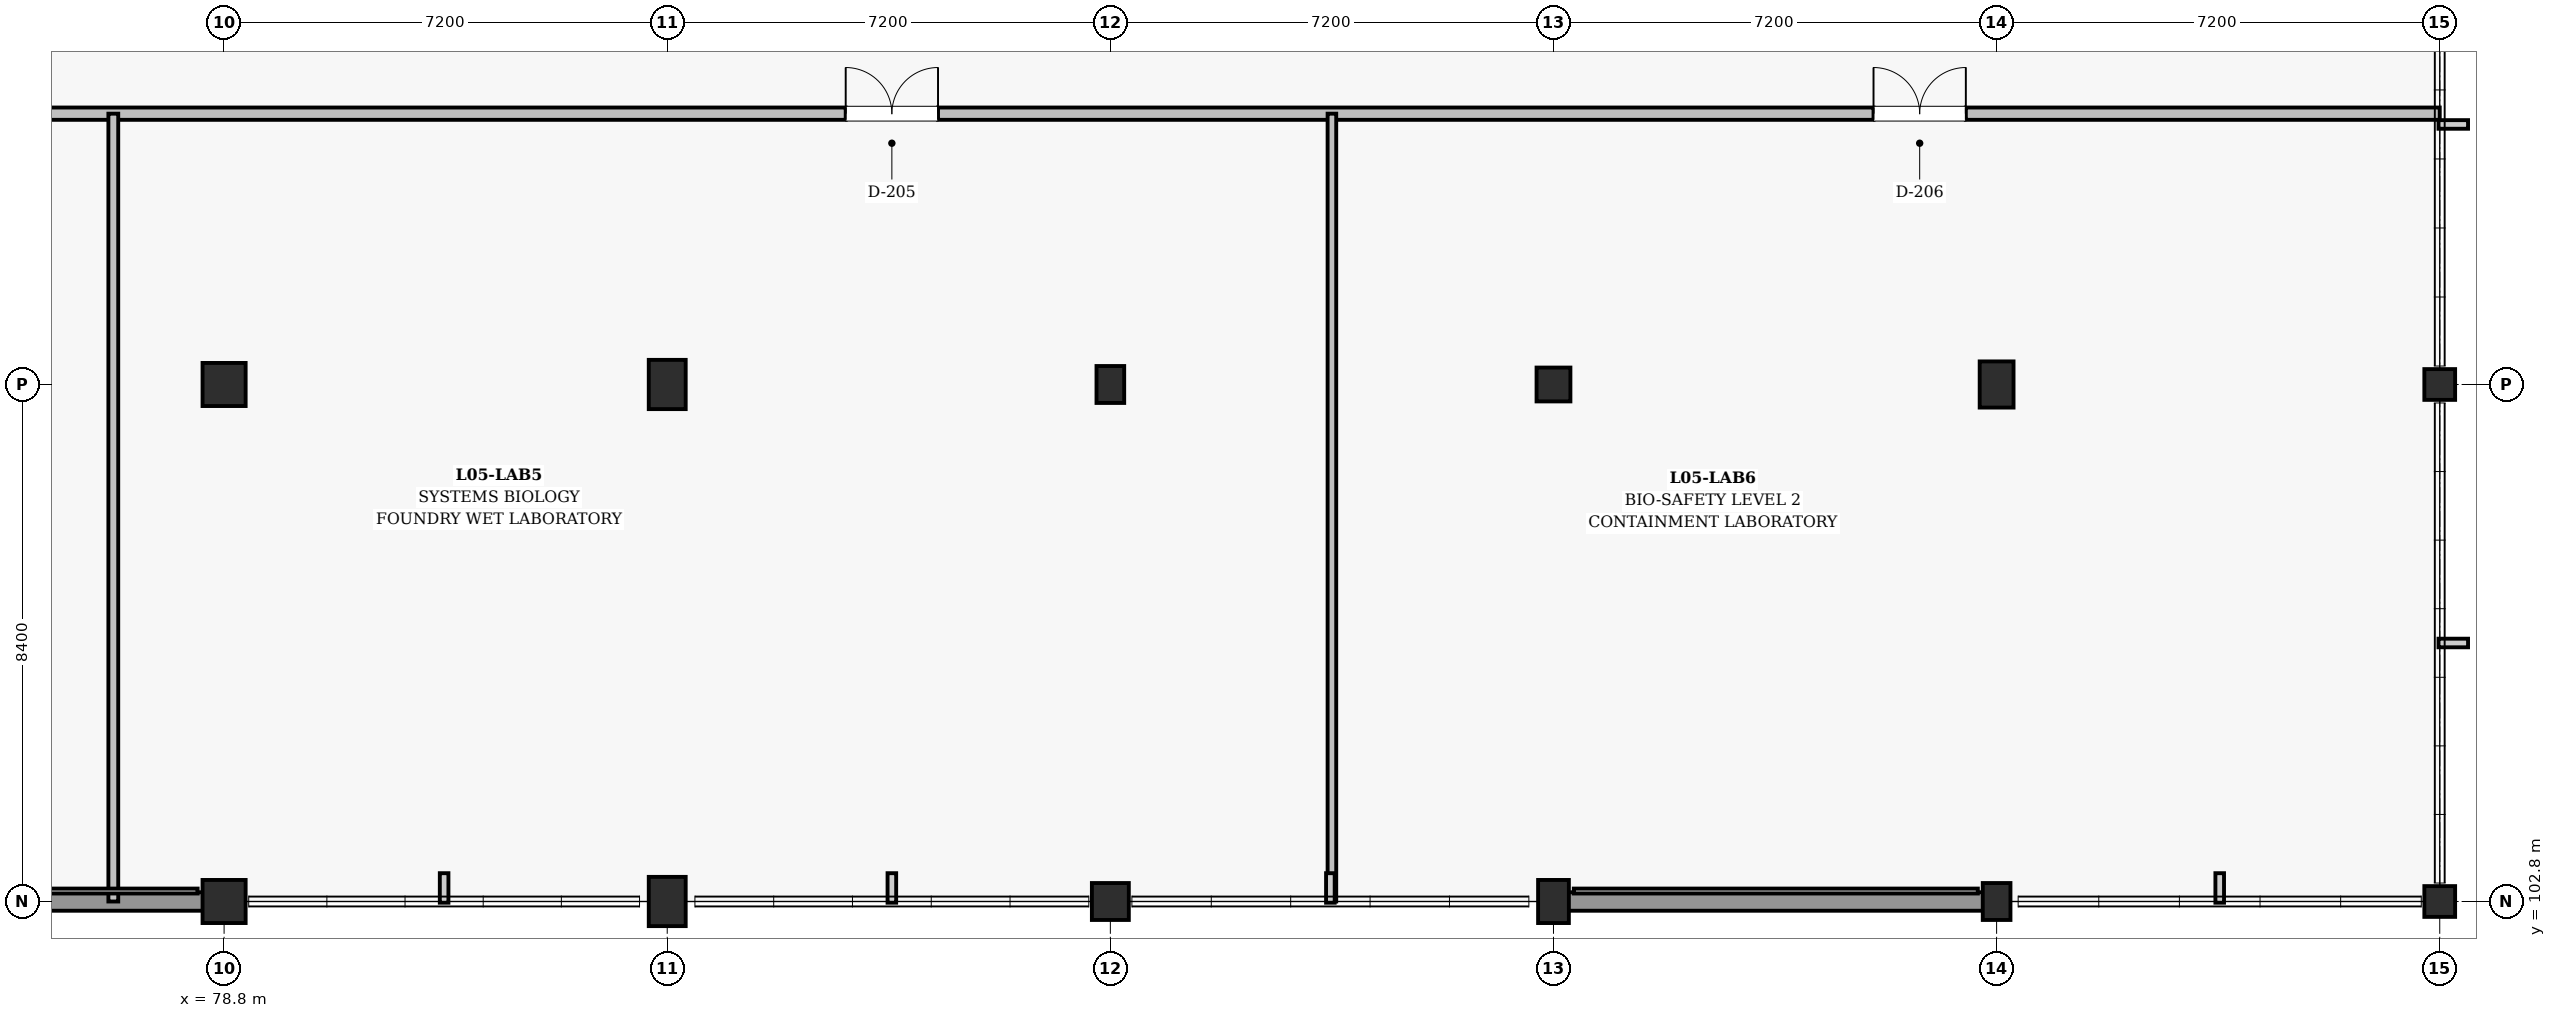
"""IFC4 building model, lengths in metres.
Left out: names, types, materials, properties, quantities, classifications, styles, units other than length and angle.
Written with IfcOpenShell. Run it as: python <this file> out.ifc"""

import sys

from ifc_helpers import new_model, si_unit, direction, frame, frame_2d, origin, origin_2d, place, context, subcontext, project, spatial, rectangle, extrude, element, fill, save


model = new_model("IFC4")
c1 = context("Model", 3, precision=1e-05, world=origin(), true_north=direction((0.0, 1.0)))
c2 = subcontext(c1, "Body", "Model", "MODEL_VIEW")
j1 = project(units=[si_unit("LENGTHUNIT", "METRE"), si_unit("PLANEANGLEUNIT", "RADIAN")], contexts=[c1])
p1 = place(None, origin())
s1 = spatial("IfcSite", under=j1, at=p1, CompositionType="ELEMENT")
p2 = place(p1, origin())
s2 = spatial("IfcBuilding", under=s1, at=p2, CompositionType="ELEMENT")
p3 = place(p2, frame((0.0, 0.0, 23.4)))
s3 = spatial("IfcBuildingStorey", under=s2, at=p3, CompositionType="ELEMENT", Elevation=23.4)
for number, where, z_axis, x_axis in (
    (1, (78.8, 102.8, 0.0), (0.0, 0.0, 1.0), (1.0, 0.0, 0.0)),
    (2, (78.8, 111.2, 0.0), (0.0, 0.0, 1.0), (1.0, 0.0, 0.0)),
):
    element("IfcColumn", number, at=place(p3, frame(where, z_axis=z_axis, x_axis=x_axis)), inside=s3, PredefinedType="COLUMN", context=c2, shape_type="SweptSolid", body=[
        extrude(rectangle(XDim=0.7, YDim=0.7, at=origin_2d()), origin(), (0.0, 0.0, 1.0), 4.5),
    ])
for number, where, z_axis, x_axis in (
    (3, (86.0, 102.8, 0.0), (0.0, 0.0, 1.0), (1.0, 0.0, 0.0)),
    (4, (86.0, 111.2, 0.0), (0.0, 0.0, 1.0), (1.0, 0.0, 0.0)),
):
    element("IfcColumn", number, at=place(p3, frame(where, z_axis=z_axis, x_axis=x_axis)), inside=s3, PredefinedType="COLUMN", context=c2, shape_type="SweptSolid", body=[
        extrude(rectangle(XDim=0.6, YDim=0.8, at=origin_2d()), origin(), (0.0, 0.0, 1.0), 4.5),
    ])
p4 = place(p3, frame((93.2, 102.8, 0.0), z_axis=(0.0, 0.0, 1.0), x_axis=(1.0, 0.0, 0.0)))
e5 = element("IfcColumn", 5, at=p4, inside=s3, PredefinedType="COLUMN", context=c2, shape_type="SweptSolid", body=[
    extrude(rectangle(XDim=0.6, YDim=0.6, at=origin_2d()), origin(), (0.0, 0.0, 1.0), 4.5),
])
p5 = place(p3, frame((93.2, 111.2, 0.0), z_axis=(0.0, 0.0, 1.0), x_axis=(1.0, 0.0, 0.0)))
e6 = element("IfcColumn", 6, at=p5, inside=s3, PredefinedType="COLUMN", context=c2, shape_type="SweptSolid", body=[
    extrude(rectangle(XDim=0.45, YDim=0.6, at=origin_2d()), origin(), (0.0, 0.0, 1.0), 4.5),
])
p6 = place(p3, frame((100.4, 102.8, 0.0), z_axis=(0.0, 0.0, 1.0), x_axis=(1.0, 0.0, 0.0)))
e7 = element("IfcColumn", 7, at=p6, inside=s3, PredefinedType="COLUMN", context=c2, shape_type="SweptSolid", body=[
    extrude(rectangle(XDim=0.5, YDim=0.7, at=origin_2d()), origin(), (0.0, 0.0, 1.0), 4.5),
])
p7 = place(p3, frame((100.4, 111.2, 0.0), z_axis=(0.0, 0.0, 1.0), x_axis=(1.0, 0.0, 0.0)))
e8 = element("IfcColumn", 8, at=p7, inside=s3, PredefinedType="COLUMN", context=c2, shape_type="SweptSolid", body=[
    extrude(rectangle(XDim=0.55, YDim=0.55, at=origin_2d()), origin(), (0.0, 0.0, 1.0), 4.5),
])
p8 = place(p3, frame((107.6, 102.8, 0.0), z_axis=(0.0, 0.0, 1.0), x_axis=(1.0, 0.0, 0.0)))
e9 = element("IfcColumn", 9, at=p8, inside=s3, PredefinedType="COLUMN", context=c2, shape_type="SweptSolid", body=[
    extrude(rectangle(XDim=0.45, YDim=0.6, at=origin_2d()), origin(), (0.0, 0.0, 1.0), 4.5),
])
p9 = place(p3, frame((107.6, 111.2, 0.0), z_axis=(0.0, 0.0, 1.0), x_axis=(1.0, 0.0, 0.0)))
e10 = element("IfcColumn", 10, at=p9, inside=s3, PredefinedType="COLUMN", context=c2, shape_type="SweptSolid", body=[
    extrude(rectangle(XDim=0.55, YDim=0.75, at=origin_2d()), origin(), (0.0, 0.0, 1.0), 4.5),
])
for number, where, z_axis, x_axis in (
    (11, (114.8, 102.8, 0.0), (0.0, 0.0, 1.0), (1.0, 0.0, 0.0)),
    (12, (114.8, 111.2, 0.0), (0.0, 0.0, 1.0), (1.0, 0.0, 0.0)),
):
    element("IfcColumn", number, at=place(p3, frame(where, z_axis=z_axis, x_axis=x_axis)), inside=s3, PredefinedType="COLUMN", context=c2, shape_type="SweptSolid", body=[
        extrude(rectangle(XDim=0.5, YDim=0.5, at=origin_2d()), origin(), (0.0, 0.0, 1.0), 4.5),
    ])
p10 = place(p3, frame((71.88, 102.8, 0.0), z_axis=(0.0, 0.0, 1.0), x_axis=(1.0, 0.0, 0.0)))
e13 = element("IfcWall", 13, at=p10, inside=s3, PredefinedType="SOLIDWALL", context=c2, shape_type="SweptSolid", body=[
    extrude(rectangle(XDim=6.59, YDim=0.3, at=frame_2d((3.295, 0.0))), origin(), (0.0, 0.0, 1.0), 2.955),
])
p11 = place(p3, frame((100.63, 102.8, 0.0), z_axis=(0.0, 0.0, 1.0), x_axis=(1.0, 0.0, 0.0)))
e14 = element("IfcWall", 14, at=p11, inside=s3, PredefinedType="SOLIDWALL", context=c2, shape_type="SweptSolid", body=[
    extrude(rectangle(XDim=6.765, YDim=0.3, at=frame_2d((3.383, 0.0))), origin(), (0.0, 0.0, 1.0), 2.955),
])
p12 = place(p3, frame((14.0, 115.6, 0.0), z_axis=(0.0, 0.0, 1.0), x_axis=(1.0, 0.0, 0.0)))
e15 = element("IfcWall", 15, at=p12, inside=s3, PredefinedType="SOLIDWALL", context=c2, shape_type="SweptSolid", body=[
    extrude(rectangle(XDim=100.8, YDim=0.2, at=frame_2d((50.4, 0.0))), origin(), (0.0, 0.0, 1.0), 2.96),
])
p13 = place(p12, frame((29.9, 0.0, 0.0)))
e16 = element("IfcOpeningElement", 16, at=p13, cuts=e15, PredefinedType="OPENING", context=c2, shape_type="SweptSolid", body=[
    extrude(rectangle(XDim=1.1, YDim=2.15, at=frame_2d((0.55, 1.075))), frame((0.0, 0.11, 0.0), z_axis=(0.0, -1.0, 0.0), x_axis=(1.0, 0.0, 0.0)), (0.0, 0.0, 1.0), 0.22),
])
p14 = place(p12, frame((7.4, 0.0, 0.0)))
e17 = element("IfcOpeningElement", 17, at=p14, cuts=e15, PredefinedType="OPENING", context=c2, shape_type="SweptSolid", body=[
    extrude(rectangle(XDim=1.5, YDim=2.2, at=frame_2d((0.75, 1.1))), frame((0.0, 0.11, 0.0), z_axis=(0.0, -1.0, 0.0), x_axis=(1.0, 0.0, 0.0)), (0.0, 0.0, 1.0), 0.22),
])
p15 = place(p12, frame((23.8, 0.0, 0.0)))
e18 = element("IfcOpeningElement", 18, at=p15, cuts=e15, PredefinedType="OPENING", context=c2, shape_type="SweptSolid", body=[
    extrude(rectangle(XDim=1.5, YDim=2.2, at=frame_2d((0.75, 1.1))), frame((0.0, 0.11, 0.0), z_axis=(0.0, -1.0, 0.0), x_axis=(1.0, 0.0, 0.0)), (0.0, 0.0, 1.0), 0.22),
])
p16 = place(p12, frame((39.4, 0.0, 0.0)))
e19 = element("IfcOpeningElement", 19, at=p16, cuts=e15, PredefinedType="OPENING", context=c2, shape_type="SweptSolid", body=[
    extrude(rectangle(XDim=1.5, YDim=2.2, at=frame_2d((0.75, 1.1))), frame((0.0, 0.11, 0.0), z_axis=(0.0, -1.0, 0.0), x_axis=(1.0, 0.0, 0.0)), (0.0, 0.0, 1.0), 0.22),
])
p17 = place(p12, frame((54.9, 0.0, 0.0)))
e20 = element("IfcOpeningElement", 20, at=p17, cuts=e15, PredefinedType="OPENING", context=c2, shape_type="SweptSolid", body=[
    extrude(rectangle(XDim=1.5, YDim=2.2, at=frame_2d((0.75, 1.1))), frame((0.0, 0.11, 0.0), z_axis=(0.0, -1.0, 0.0), x_axis=(1.0, 0.0, 0.0)), (0.0, 0.0, 1.0), 0.22),
])
p18 = place(p12, frame((74.9, 0.0, 0.0)))
e21 = element("IfcOpeningElement", 21, at=p18, cuts=e15, PredefinedType="OPENING", context=c2, shape_type="SweptSolid", body=[
    extrude(rectangle(XDim=1.5, YDim=2.2, at=frame_2d((0.75, 1.1))), frame((0.0, 0.11, 0.0), z_axis=(0.0, -1.0, 0.0), x_axis=(1.0, 0.0, 0.0)), (0.0, 0.0, 1.0), 0.22),
])
p19 = place(p12, frame((91.6, 0.0, 0.0)))
e22 = element("IfcOpeningElement", 22, at=p19, cuts=e15, PredefinedType="OPENING", context=c2, shape_type="SweptSolid", body=[
    extrude(rectangle(XDim=1.5, YDim=2.2, at=frame_2d((0.75, 1.1))), frame((0.0, 0.11, 0.0), z_axis=(0.0, -1.0, 0.0), x_axis=(1.0, 0.0, 0.0)), (0.0, 0.0, 1.0), 0.22),
])
p20 = place(p3, frame((77.0, 102.8, 0.0), z_axis=(0.0, 0.0, 1.0), x_axis=(0.0, 1.0, 0.0)))
e23 = element("IfcWall", 23, at=p20, inside=s3, PredefinedType="PARTITIONING", context=c2, shape_type="SweptSolid", body=[
    extrude(rectangle(XDim=12.8, YDim=0.16, at=frame_2d((6.4, 0.0))), origin(), (0.0, 0.0, 1.0), 3.36),
])
p21 = place(p3, frame((96.8, 102.8, 0.0), z_axis=(0.0, 0.0, 1.0), x_axis=(0.0, 1.0, 0.0)))
e24 = element("IfcWall", 24, at=p21, inside=s3, PredefinedType="PARTITIONING", context=c2, shape_type="SweptSolid", body=[
    extrude(rectangle(XDim=12.8, YDim=0.14, at=frame_2d((6.4, 0.0))), origin(), (0.0, 0.0, 1.0), 3.51),
])
p22 = place(p18, origin())
e25 = element("IfcDoor", 25, at=p22, inside=s3, OperationType="DOUBLE_DOOR_SINGLE_SWING", PredefinedType="DOOR", context=c2, shape_type="SweptSolid", body=[
    extrude(rectangle(XDim=1.5, YDim=2.2, at=frame_2d((0.75, 1.1))), frame((0.0, 0.025, 0.0), z_axis=(0.0, -1.0, 0.0), x_axis=(1.0, 0.0, 0.0)), (0.0, 0.0, 1.0), 0.05),
])
fill(e21, e25)
p23 = place(p19, origin())
e26 = element("IfcDoor", 26, at=p23, inside=s3, OperationType="DOUBLE_DOOR_SINGLE_SWING", PredefinedType="DOOR", context=c2, shape_type="SweptSolid", body=[
    extrude(rectangle(XDim=1.5, YDim=2.2, at=frame_2d((0.75, 1.1))), frame((0.0, 0.025, 0.0), z_axis=(0.0, -1.0, 0.0), x_axis=(1.0, 0.0, 0.0)), (0.0, 0.0, 1.0), 0.05),
])
fill(e22, e26)
save(model, sys.argv[1])
